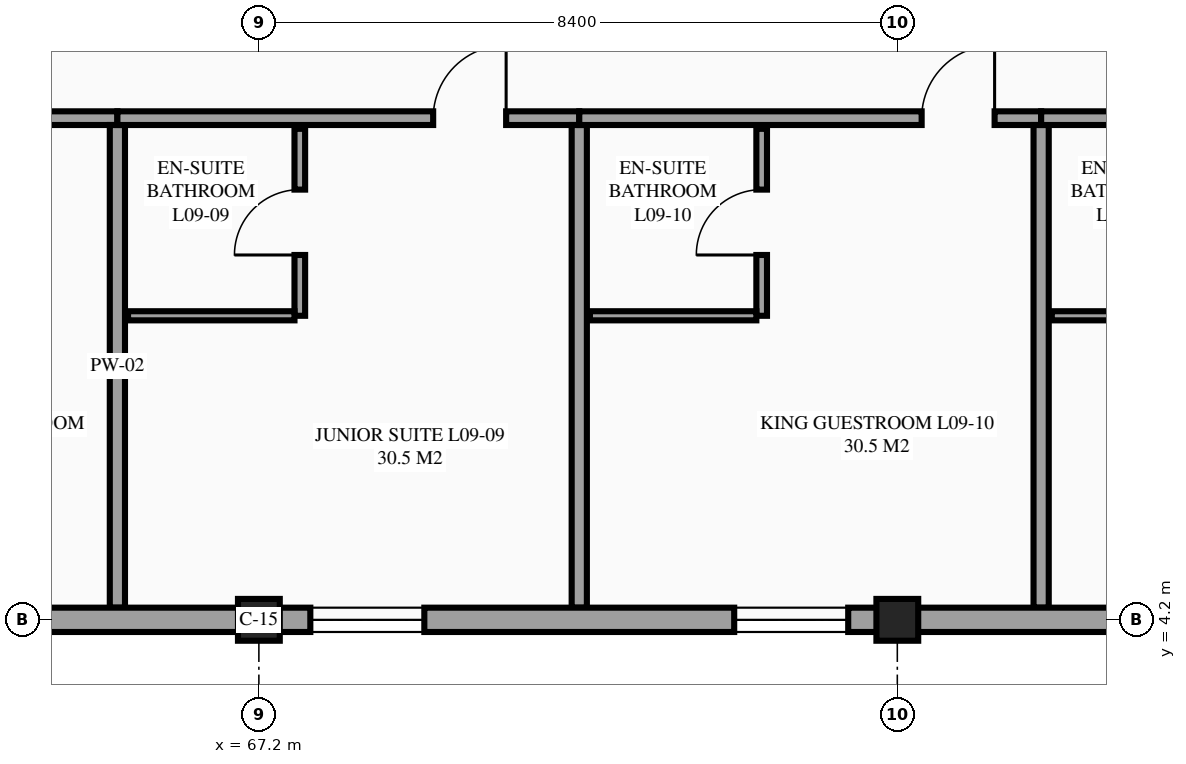
"""IFC4 building model, lengths in metres.
Left out: names, types, materials, properties, quantities, classifications, styles, units other than length and angle.
Written with IfcOpenShell. Run it as: python <this file> out.ifc"""

import sys

from ifc_helpers import new_model, si_unit, direction, frame, frame_2d, origin, origin_2d, place, context, subcontext, project, spatial, rectangle, extrude, element, fill, save


model = new_model("IFC4")
c1 = context("Model", 3, precision=1e-05, world=origin(), true_north=direction((0.0, 1.0)))
c2 = subcontext(c1, "Body", "Model", "MODEL_VIEW")
j1 = project(units=[si_unit("LENGTHUNIT", "METRE"), si_unit("PLANEANGLEUNIT", "RADIAN")], contexts=[c1])
p1 = place(None, origin())
s1 = spatial("IfcSite", under=j1, at=p1, CompositionType="ELEMENT")
p2 = place(p1, origin())
s2 = spatial("IfcBuilding", under=s1, at=p2, CompositionType="ELEMENT")
p3 = place(p2, frame((0.0, 0.0, 36.3)))
s3 = spatial("IfcBuildingStorey", under=s2, at=p3, CompositionType="ELEMENT", Elevation=36.3)
for number, where, z_axis, x_axis in (
    (1, (67.2, 4.2, 0.0), (0.0, 0.0, 1.0), (1.0, 0.0, 0.0)),
    (2, (75.6, 4.2, 0.0), (0.0, 0.0, 1.0), (1.0, 0.0, 0.0)),
):
    element("IfcColumn", number, at=place(p3, frame(where, z_axis=z_axis, x_axis=x_axis)), inside=s3, PredefinedType="COLUMN", context=c2, shape_type="SweptSolid", body=[
        extrude(rectangle(XDim=0.55, YDim=0.55, at=origin_2d()), origin(), (0.0, 0.0, 1.0), 3.6),
    ])
p4 = place(p3, frame((59.261, 10.8, 0.0), z_axis=(0.0, 0.0, 1.0), x_axis=(1.0, 0.0, 0.0)))
e3 = element("IfcWall", 3, at=p4, inside=s3, PredefinedType="PARTITIONING", context=c2, shape_type="SweptSolid", body=[
    extrude(rectangle(XDim=6.077, YDim=0.18, at=frame_2d((3.039, 0.0))), origin(), (0.0, 0.0, 1.0), 3.375),
])
p5 = place(p4, frame((4.155, 0.0, 0.0)))
e4 = element("IfcOpeningElement", 4, at=p5, cuts=e3, PredefinedType="OPENING", context=c2, shape_type="SweptSolid", body=[
    extrude(rectangle(XDim=0.96, YDim=2.15, at=frame_2d((0.48, 1.075))), frame((0.0, 0.1, 0.0), z_axis=(0.0, -1.0, 0.0), x_axis=(1.0, 0.0, 0.0)), (0.0, 0.0, 1.0), 0.2),
])
p6 = place(p3, frame((65.338, 4.36, 0.0), z_axis=(0.0, 0.0, 1.0), x_axis=(0.0, 1.0, 0.0)))
e5 = element("IfcWall", 5, at=p6, inside=s3, PredefinedType="PARTITIONING", context=c2, shape_type="SweptSolid", body=[
    extrude(rectangle(XDim=6.35, YDim=0.2, at=frame_2d((3.175, 0.0))), origin(), (0.0, 0.0, 1.0), 3.375),
])
p7 = place(p3, frame((65.338, 10.8, 0.0), z_axis=(0.0, 0.0, 1.0), x_axis=(1.0, 0.0, 0.0)))
e6 = element("IfcWall", 6, at=p7, inside=s3, PredefinedType="PARTITIONING", context=c2, shape_type="SweptSolid", body=[
    extrude(rectangle(XDim=6.077, YDim=0.18, at=frame_2d((3.039, 0.0))), origin(), (0.0, 0.0, 1.0), 3.375),
])
p8 = place(p7, frame((4.155, 0.0, 0.0)))
e7 = element("IfcOpeningElement", 7, at=p8, cuts=e6, PredefinedType="OPENING", context=c2, shape_type="SweptSolid", body=[
    extrude(rectangle(XDim=0.96, YDim=2.15, at=frame_2d((0.48, 1.075))), frame((0.0, 0.1, 0.0), z_axis=(0.0, -1.0, 0.0), x_axis=(1.0, 0.0, 0.0)), (0.0, 0.0, 1.0), 0.2),
])
p9 = place(p3, frame((71.415, 4.36, 0.0), z_axis=(0.0, 0.0, 1.0), x_axis=(0.0, 1.0, 0.0)))
e8 = element("IfcWall", 8, at=p9, inside=s3, PredefinedType="PARTITIONING", context=c2, shape_type="SweptSolid", body=[
    extrude(rectangle(XDim=6.35, YDim=0.2, at=frame_2d((3.175, 0.0))), origin(), (0.0, 0.0, 1.0), 3.375),
])
p10 = place(p3, frame((67.739, 8.2, 0.0), z_axis=(0.0, 0.0, 1.0), x_axis=(0.0, 1.0, 0.0)))
e9 = element("IfcWall", 9, at=p10, inside=s3, PredefinedType="PARTITIONING", context=c2, shape_type="SweptSolid", body=[
    extrude(rectangle(XDim=2.46, YDim=0.14, at=frame_2d((1.23, 0.0))), origin(), (0.0, 0.0, 1.0), 3.375),
])
p11 = place(p10, frame((0.8, 0.0, 0.0)))
e10 = element("IfcOpeningElement", 10, at=p11, cuts=e9, PredefinedType="OPENING", context=c2, shape_type="SweptSolid", body=[
    extrude(rectangle(XDim=0.86, YDim=2.1, at=frame_2d((0.43, 1.05))), frame((0.0, 0.08, 0.0), z_axis=(0.0, -1.0, 0.0), x_axis=(1.0, 0.0, 0.0)), (0.0, 0.0, 1.0), 0.16),
])
p12 = place(p3, frame((65.479, 8.2, 0.0), z_axis=(0.0, 0.0, 1.0), x_axis=(1.0, 0.0, 0.0)))
e11 = element("IfcWall", 11, at=p12, inside=s3, PredefinedType="PARTITIONING", context=c2, shape_type="SweptSolid", body=[
    extrude(rectangle(XDim=2.19, YDim=0.12, at=frame_2d((1.095, 0.0))), origin(), (0.0, 0.0, 1.0), 3.375),
])
p13 = place(p3, frame((71.415, 10.8, 0.0), z_axis=(0.0, 0.0, 1.0), x_axis=(1.0, 0.0, 0.0)))
e12 = element("IfcWall", 12, at=p13, inside=s3, PredefinedType="PARTITIONING", context=c2, shape_type="SweptSolid", body=[
    extrude(rectangle(XDim=6.077, YDim=0.18, at=frame_2d((3.039, 0.0))), origin(), (0.0, 0.0, 1.0), 3.375),
])
p14 = place(p13, frame((4.505, 0.0, 0.0)))
e13 = element("IfcOpeningElement", 13, at=p14, cuts=e12, PredefinedType="OPENING", context=c2, shape_type="SweptSolid", body=[
    extrude(rectangle(XDim=0.96, YDim=2.15, at=frame_2d((0.48, 1.075))), frame((0.0, 0.1, 0.0), z_axis=(0.0, -1.0, 0.0), x_axis=(1.0, 0.0, 0.0)), (0.0, 0.0, 1.0), 0.2),
])
p15 = place(p3, frame((77.492, 4.36, 0.0), z_axis=(0.0, 0.0, 1.0), x_axis=(0.0, 1.0, 0.0)))
e14 = element("IfcWall", 14, at=p15, inside=s3, PredefinedType="PARTITIONING", context=c2, shape_type="SweptSolid", body=[
    extrude(rectangle(XDim=6.35, YDim=0.2, at=frame_2d((3.175, 0.0))), origin(), (0.0, 0.0, 1.0), 3.375),
])
p16 = place(p3, frame((73.815, 8.2, 0.0), z_axis=(0.0, 0.0, 1.0), x_axis=(0.0, 1.0, 0.0)))
e15 = element("IfcWall", 15, at=p16, inside=s3, PredefinedType="PARTITIONING", context=c2, shape_type="SweptSolid", body=[
    extrude(rectangle(XDim=2.46, YDim=0.14, at=frame_2d((1.23, 0.0))), origin(), (0.0, 0.0, 1.0), 3.375),
])
p17 = place(p16, frame((0.8, 0.0, 0.0)))
e16 = element("IfcOpeningElement", 16, at=p17, cuts=e15, PredefinedType="OPENING", context=c2, shape_type="SweptSolid", body=[
    extrude(rectangle(XDim=0.86, YDim=2.1, at=frame_2d((0.43, 1.05))), frame((0.0, 0.08, 0.0), z_axis=(0.0, -1.0, 0.0), x_axis=(1.0, 0.0, 0.0)), (0.0, 0.0, 1.0), 0.16),
])
p18 = place(p3, frame((71.555, 8.2, 0.0), z_axis=(0.0, 0.0, 1.0), x_axis=(1.0, 0.0, 0.0)))
e17 = element("IfcWall", 17, at=p18, inside=s3, PredefinedType="PARTITIONING", context=c2, shape_type="SweptSolid", body=[
    extrude(rectangle(XDim=2.19, YDim=0.12, at=frame_2d((1.095, 0.0))), origin(), (0.0, 0.0, 1.0), 3.375),
])
p19 = place(p3, frame((77.492, 10.8, 0.0), z_axis=(0.0, 0.0, 1.0), x_axis=(1.0, 0.0, 0.0)))
e18 = element("IfcWall", 18, at=p19, inside=s3, PredefinedType="PARTITIONING", context=c2, shape_type="SweptSolid", body=[
    extrude(rectangle(XDim=6.077, YDim=0.18, at=frame_2d((3.039, 0.0))), origin(), (0.0, 0.0, 1.0), 3.375),
])
p20 = place(p19, frame((4.155, 0.0, 0.0)))
e19 = element("IfcOpeningElement", 19, at=p20, cuts=e18, PredefinedType="OPENING", context=c2, shape_type="SweptSolid", body=[
    extrude(rectangle(XDim=0.96, YDim=2.15, at=frame_2d((0.48, 1.075))), frame((0.0, 0.1, 0.0), z_axis=(0.0, -1.0, 0.0), x_axis=(1.0, 0.0, 0.0)), (0.0, 0.0, 1.0), 0.2),
])
p21 = place(p3, frame((77.632, 8.2, 0.0), z_axis=(0.0, 0.0, 1.0), x_axis=(1.0, 0.0, 0.0)))
e20 = element("IfcWall", 20, at=p21, inside=s3, PredefinedType="PARTITIONING", context=c2, shape_type="SweptSolid", body=[
    extrude(rectangle(XDim=2.19, YDim=0.12, at=frame_2d((1.095, 0.0))), origin(), (0.0, 0.0, 1.0), 3.375),
])
p22 = place(p3, frame((50.4, 4.2, 0.0), z_axis=(0.0, 0.0, 1.0), x_axis=(1.0, 0.0, 0.0)))
e21 = element("IfcWall", 21, at=p22, inside=s3, PredefinedType="STANDARD", context=c2, shape_type="SweptSolid", body=[
    extrude(rectangle(XDim=16.8, YDim=0.32, at=frame_2d((8.4, 0.0))), origin(), (0.0, 0.0, 1.0), 2.68),
])
p23 = place(p22, frame((5.073, 0.0, 0.85)))
e22 = element("IfcOpeningElement", 22, at=p23, cuts=e21, PredefinedType="OPENING", context=c2, shape_type="SweptSolid", body=[
    extrude(rectangle(XDim=1.5, YDim=1.5, at=frame_2d((0.75, 0.75))), frame((0.0, 0.17, 0.0), z_axis=(0.0, -1.0, 0.0), x_axis=(1.0, 0.0, 0.0)), (0.0, 0.0, 1.0), 0.34),
])
p24 = place(p22, frame((11.15, 0.0, 0.85)))
e23 = element("IfcOpeningElement", 23, at=p24, cuts=e21, PredefinedType="OPENING", context=c2, shape_type="SweptSolid", body=[
    extrude(rectangle(XDim=1.5, YDim=1.5, at=frame_2d((0.75, 0.75))), frame((0.0, 0.17, 0.0), z_axis=(0.0, -1.0, 0.0), x_axis=(1.0, 0.0, 0.0)), (0.0, 0.0, 1.0), 0.34),
])
p25 = place(p3, frame((67.2, 4.2, 0.0), z_axis=(0.0, 0.0, 1.0), x_axis=(1.0, 0.0, 0.0)))
e24 = element("IfcWall", 24, at=p25, inside=s3, PredefinedType="STANDARD", context=c2, shape_type="SweptSolid", body=[
    extrude(rectangle(XDim=8.4, YDim=0.32, at=frame_2d((4.2, 0.0))), origin(), (0.0, 0.0, 1.0), 3.126),
])
p26 = place(p25, frame((0.677, 0.0, 0.85)))
e25 = element("IfcOpeningElement", 25, at=p26, cuts=e24, PredefinedType="OPENING", context=c2, shape_type="SweptSolid", body=[
    extrude(rectangle(XDim=1.5, YDim=1.5, at=frame_2d((0.75, 0.75))), frame((0.0, 0.17, 0.0), z_axis=(0.0, -1.0, 0.0), x_axis=(1.0, 0.0, 0.0)), (0.0, 0.0, 1.0), 0.34),
])
p27 = place(p25, frame((6.254, 0.0, 0.85)))
e26 = element("IfcOpeningElement", 26, at=p27, cuts=e24, PredefinedType="OPENING", context=c2, shape_type="SweptSolid", body=[
    extrude(rectangle(XDim=1.5, YDim=1.5, at=frame_2d((0.75, 0.75))), frame((0.0, 0.17, 0.0), z_axis=(0.0, -1.0, 0.0), x_axis=(1.0, 0.0, 0.0)), (0.0, 0.0, 1.0), 0.34),
])
p28 = place(p3, frame((75.6, 4.2, 0.0), z_axis=(0.0, 0.0, 1.0), x_axis=(1.0, 0.0, 0.0)))
e27 = element("IfcWall", 27, at=p28, inside=s3, PredefinedType="STANDARD", context=c2, shape_type="SweptSolid", body=[
    extrude(rectangle(XDim=8.4, YDim=0.32, at=frame_2d((4.2, 0.0))), origin(), (0.0, 0.0, 1.0), 2.43),
])
p29 = place(p28, frame((4.181, 0.0, 0.85)))
e28 = element("IfcOpeningElement", 28, at=p29, cuts=e27, PredefinedType="OPENING", context=c2, shape_type="SweptSolid", body=[
    extrude(rectangle(XDim=1.5, YDim=1.5, at=frame_2d((0.75, 0.75))), frame((0.0, 0.17, 0.0), z_axis=(0.0, -1.0, 0.0), x_axis=(1.0, 0.0, 0.0)), (0.0, 0.0, 1.0), 0.34),
])
p30 = place(p26, origin())
e29 = element("IfcWindow", 29, at=p30, inside=s3, PartitioningType="SINGLE_PANEL", PredefinedType="WINDOW", context=c2, shape_type="SweptSolid", body=[
    extrude(rectangle(XDim=1.5, YDim=1.5, at=frame_2d((0.75, 0.75))), frame((0.0, 0.03, 0.0), z_axis=(0.0, -1.0, 0.0), x_axis=(1.0, 0.0, 0.0)), (0.0, 0.0, 1.0), 0.06),
])
fill(e25, e29)
p31 = place(p27, origin())
e30 = element("IfcWindow", 30, at=p31, inside=s3, PartitioningType="SINGLE_PANEL", PredefinedType="WINDOW", context=c2, shape_type="SweptSolid", body=[
    extrude(rectangle(XDim=1.5, YDim=1.5, at=frame_2d((0.75, 0.75))), frame((0.0, 0.03, 0.0), z_axis=(0.0, -1.0, 0.0), x_axis=(1.0, 0.0, 0.0)), (0.0, 0.0, 1.0), 0.06),
])
fill(e26, e30)
p32 = place(p8, origin())
e31 = element("IfcDoor", 31, at=p32, inside=s3, OperationType="SINGLE_SWING_RIGHT", PredefinedType="DOOR", context=c2, shape_type="SweptSolid", body=[
    extrude(rectangle(XDim=0.96, YDim=2.15, at=frame_2d((0.48, 1.075))), frame((0.0, 0.025, 0.0), z_axis=(0.0, -1.0, 0.0), x_axis=(1.0, 0.0, 0.0)), (0.0, 0.0, 1.0), 0.05),
])
fill(e7, e31)
p33 = place(p11, origin())
e32 = element("IfcDoor", 32, at=p33, inside=s3, OperationType="SINGLE_SWING_LEFT", PredefinedType="DOOR", context=c2, shape_type="SweptSolid", body=[
    extrude(rectangle(XDim=0.86, YDim=2.1, at=frame_2d((0.43, 1.05))), frame((0.0, 0.025, 0.0), z_axis=(0.0, -1.0, 0.0), x_axis=(1.0, 0.0, 0.0)), (0.0, 0.0, 1.0), 0.05),
])
fill(e10, e32)
p34 = place(p14, origin())
e33 = element("IfcDoor", 33, at=p34, inside=s3, OperationType="SINGLE_SWING_RIGHT", PredefinedType="DOOR", context=c2, shape_type="SweptSolid", body=[
    extrude(rectangle(XDim=0.96, YDim=2.15, at=frame_2d((0.48, 1.075))), frame((0.0, 0.025, 0.0), z_axis=(0.0, -1.0, 0.0), x_axis=(1.0, 0.0, 0.0)), (0.0, 0.0, 1.0), 0.05),
])
fill(e13, e33)
p35 = place(p17, origin())
e34 = element("IfcDoor", 34, at=p35, inside=s3, OperationType="SINGLE_SWING_LEFT", PredefinedType="DOOR", context=c2, shape_type="SweptSolid", body=[
    extrude(rectangle(XDim=0.86, YDim=2.1, at=frame_2d((0.43, 1.05))), frame((0.0, 0.025, 0.0), z_axis=(0.0, -1.0, 0.0), x_axis=(1.0, 0.0, 0.0)), (0.0, 0.0, 1.0), 0.05),
])
fill(e16, e34)
save(model, sys.argv[1])
